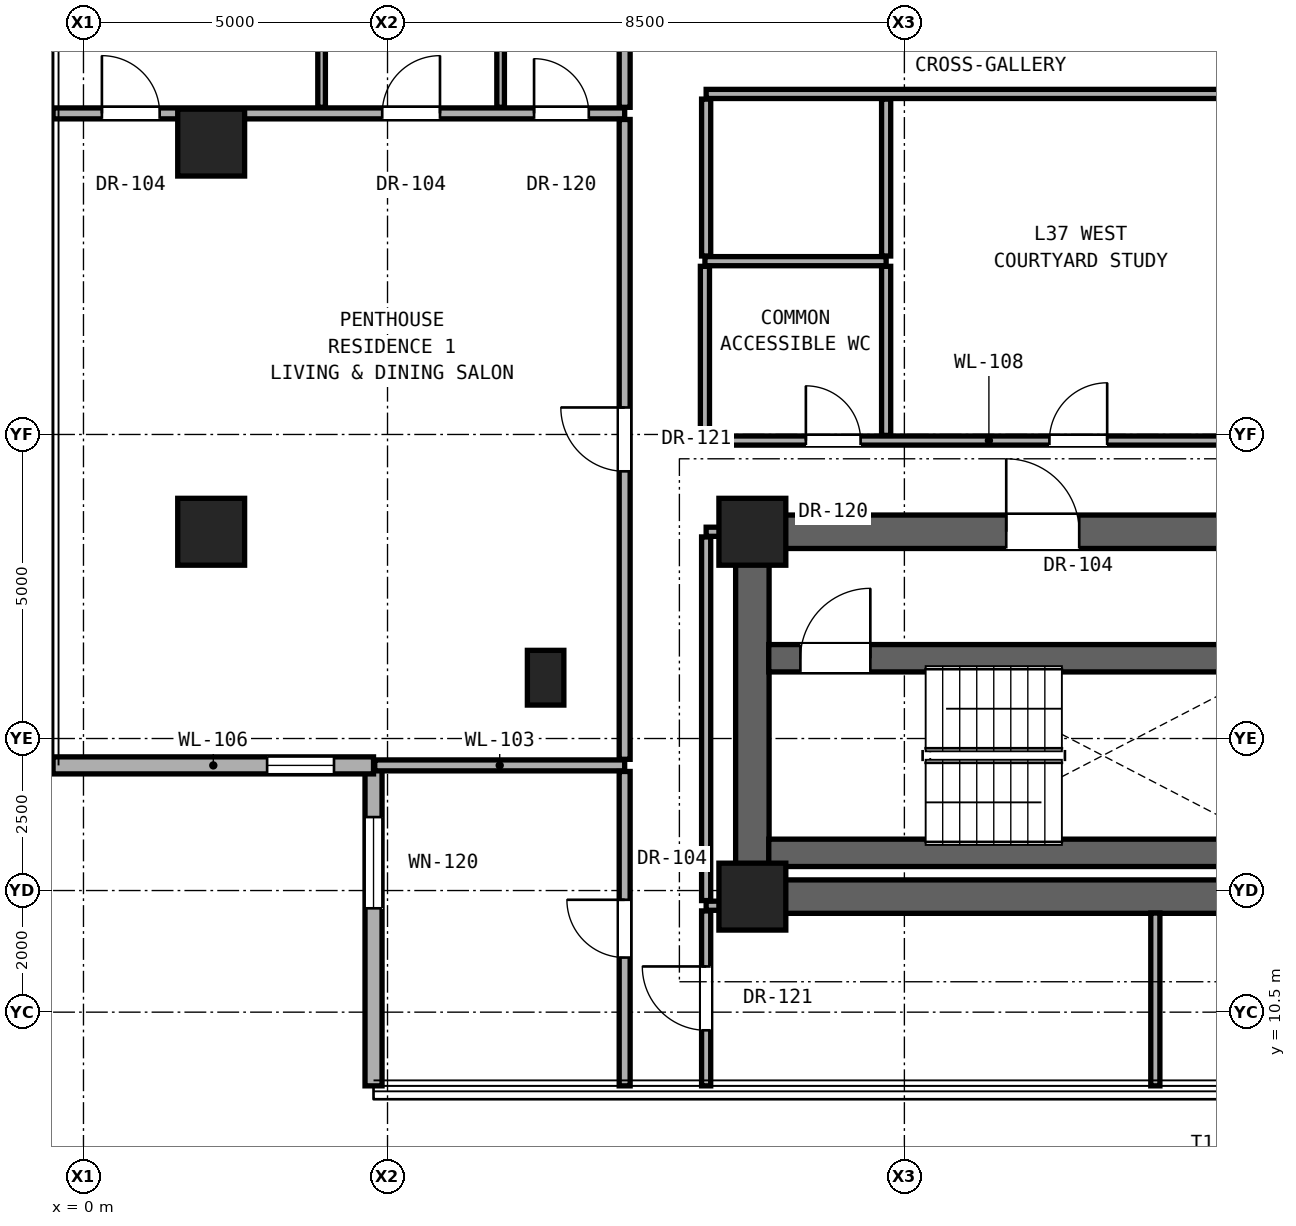
"""IFC4 building model, lengths in metres.
Left out: names, types, materials, properties, quantities, classifications, styles, units other than length and angle.
Written with IfcOpenShell. Run it as: python <this file> out.ifc"""

import sys

from ifc_helpers import new_model, si_unit, direction, frame, frame_2d, origin, origin_2d, place, context, subcontext, project, spatial, rectangle, hollow_rectangle, extrude, element, fill, save


model = new_model("IFC4")
c1 = context("Model", 3, precision=1e-05, world=origin(), true_north=direction((0.0, 1.0)))
c2 = subcontext(c1, "Body", "Model", "MODEL_VIEW")
j1 = project(units=[si_unit("LENGTHUNIT", "METRE"), si_unit("PLANEANGLEUNIT", "RADIAN")], contexts=[c1])
p1 = place(None, origin())
s1 = spatial("IfcSite", under=j1, at=p1, CompositionType="ELEMENT")
p2 = place(p1, origin())
s2 = spatial("IfcBuilding", under=s1, at=p2, CompositionType="ELEMENT")
p3 = place(p2, frame((0.0, 0.0, 131.3)))
s3 = spatial("IfcBuildingStorey", under=s2, at=p3, CompositionType="ELEMENT", Elevation=131.3)
for number, where, z_axis, x_axis in (
    (1, (11.0, 12.4, 0.0), (0.0, 0.0, 1.0), (1.0, 0.0, 0.0)),
    (2, (11.0, 18.4, 0.0), (0.0, 0.0, 1.0), (1.0, 0.0, 0.0)),
):
    element("IfcColumn", number, at=place(p3, frame(where, z_axis=z_axis, x_axis=x_axis)), inside=s3, PredefinedType="COLUMN", context=c2, shape_type="SweptSolid", body=[
        extrude(rectangle(XDim=1.1, YDim=1.1, at=origin_2d()), origin(), (0.0, 0.0, 1.0), 3.3),
    ])
for number, where, z_axis, x_axis in (
    (3, (2.1, 18.4, 0.0), (0.0, 0.0, 1.0), (1.0, 0.0, 0.0)),
    (4, (2.1, 24.8, 0.0), (0.0, 0.0, 1.0), (1.0, 0.0, 0.0)),
):
    element("IfcColumn", number, at=place(p3, frame(where, z_axis=z_axis, x_axis=x_axis)), inside=s3, PredefinedType="COLUMN", context=c2, shape_type="SweptSolid", body=[
        extrude(hollow_rectangle(XDim=1.1, YDim=1.1, WallThickness=0.06, at=origin_2d()), origin(), (0.0, 0.0, 1.0), 3.3),
    ])
p4 = place(p3, frame((7.6, 16.0, 0.0), z_axis=(0.0, 0.0, 1.0), x_axis=(1.0, 0.0, 0.0)))
e5 = element("IfcColumn", 5, at=p4, inside=s3, PredefinedType="PILASTER", context=c2, shape_type="SweptSolid", body=[
    extrude(rectangle(XDim=0.6, YDim=0.9, at=origin_2d()), origin(), (0.0, 0.0, 1.0), 3.3),
])
p5 = place(p3, frame((11.0, 12.4, 0.0), z_axis=(0.0, 0.0, 1.0), x_axis=(1.0, 0.0, 0.0)))
e6 = element("IfcWall", 6, at=p5, inside=s3, PredefinedType="SHEAR", context=c2, shape_type="SweptSolid", body=[
    extrude(rectangle(XDim=19.0, YDim=0.55, at=frame_2d((9.5, 0.0))), origin(), (0.0, 0.0, 1.0), 3.08),
])
p6 = place(p3, frame((11.0, 12.4, 0.0), z_axis=(0.0, 0.0, 1.0), x_axis=(0.0, 1.0, 0.0)))
e7 = element("IfcWall", 7, at=p6, inside=s3, PredefinedType="SHEAR", context=c2, shape_type="SweptSolid", body=[
    extrude(rectangle(XDim=6.0, YDim=0.55, at=frame_2d((3.0, 0.0))), origin(), (0.0, 0.0, 1.0), 3.08),
])
p7 = place(p3, frame((11.0, 18.4, 0.0), z_axis=(0.0, 0.0, 1.0), x_axis=(1.0, 0.0, 0.0)))
e8 = element("IfcWall", 8, at=p7, inside=s3, PredefinedType="SHEAR", context=c2, shape_type="SweptSolid", body=[
    extrude(rectangle(XDim=19.0, YDim=0.55, at=frame_2d((9.5, 0.0))), origin(), (0.0, 0.0, 1.0), 3.08),
])
p8 = place(p7, frame((4.175, 0.0, 0.0)))
e9 = element("IfcOpeningElement", 9, at=p8, cuts=e8, PredefinedType="OPENING", context=c2, shape_type="SweptSolid", body=[
    extrude(rectangle(XDim=1.2, YDim=2.25, at=frame_2d((0.6, 1.125))), frame((0.0, 0.285, 0.0), z_axis=(0.0, -1.0, 0.0), x_axis=(1.0, 0.0, 0.0)), (0.0, 0.0, 1.0), 0.57),
])
p9 = place(p7, frame((9.6, 0.0, 0.0)))
e10 = element("IfcOpeningElement", 10, at=p9, cuts=e8, PredefinedType="OPENING", context=c2, shape_type="SweptSolid", body=[
    extrude(rectangle(XDim=1.3, YDim=2.3, at=frame_2d((0.65, 1.15))), frame((0.0, 0.285, 0.0), z_axis=(0.0, -1.0, 0.0), x_axis=(1.0, 0.0, 0.0)), (0.0, 0.0, 1.0), 0.57),
])
p10 = place(p7, frame((11.9, 0.0, 0.0)))
e11 = element("IfcOpeningElement", 11, at=p10, cuts=e8, PredefinedType="OPENING", context=c2, shape_type="SweptSolid", body=[
    extrude(rectangle(XDim=1.3, YDim=2.3, at=frame_2d((0.65, 1.15))), frame((0.0, 0.285, 0.0), z_axis=(0.0, -1.0, 0.0), x_axis=(1.0, 0.0, 0.0)), (0.0, 0.0, 1.0), 0.57),
])
p11 = place(p7, frame((14.3, 0.0, 0.0)))
e12 = element("IfcOpeningElement", 12, at=p11, cuts=e8, PredefinedType="OPENING", context=c2, shape_type="SweptSolid", body=[
    extrude(rectangle(XDim=1.3, YDim=2.3, at=frame_2d((0.65, 1.15))), frame((0.0, 0.285, 0.0), z_axis=(0.0, -1.0, 0.0), x_axis=(1.0, 0.0, 0.0)), (0.0, 0.0, 1.0), 0.57),
])
p12 = place(p7, frame((16.6, 0.0, 0.0)))
e13 = element("IfcOpeningElement", 13, at=p12, cuts=e8, PredefinedType="OPENING", context=c2, shape_type="SweptSolid", body=[
    extrude(rectangle(XDim=1.3, YDim=2.3, at=frame_2d((0.65, 1.15))), frame((0.0, 0.285, 0.0), z_axis=(0.0, -1.0, 0.0), x_axis=(1.0, 0.0, 0.0)), (0.0, 0.0, 1.0), 0.57),
])
p13 = place(p3, frame((4.77, 14.558, 0.0), z_axis=(0.0, 0.0, 1.0), x_axis=(0.0, -1.0, 0.0)))
e14 = element("IfcWall", 14, at=p13, inside=s3, PredefinedType="SOLIDWALL", context=c2, shape_type="SweptSolid", body=[
    extrude(rectangle(XDim=5.27, YDim=0.28, at=frame_2d((2.635, 0.0))), origin(), (0.0, 0.0, 1.0), 3.06),
])
p14 = place(p13, frame((0.85, 0.0, 0.81)))
e15 = element("IfcOpeningElement", 15, at=p14, cuts=e14, PredefinedType="OPENING", context=c2, shape_type="SweptSolid", body=[
    extrude(rectangle(XDim=1.5, YDim=2.1, at=frame_2d((0.75, 1.05))), frame((0.0, 0.15, 0.0), z_axis=(0.0, -1.0, 0.0), x_axis=(1.0, 0.0, 0.0)), (0.0, 0.0, 1.0), 0.3),
])
p15 = place(p3, frame((-0.5, 14.558, 0.0), z_axis=(0.0, 0.0, 1.0), x_axis=(1.0, 0.0, 0.0)))
e16 = element("IfcWall", 16, at=p15, inside=s3, PredefinedType="SOLIDWALL", context=c2, shape_type="SweptSolid", body=[
    extrude(rectangle(XDim=5.27, YDim=0.28, at=frame_2d((2.635, 0.0))), origin(), (0.0, 0.0, 1.0), 3.06),
])
p16 = place(p15, frame((3.52, 0.0, 0.85)))
e17 = element("IfcOpeningElement", 17, at=p16, cuts=e16, PredefinedType="OPENING", context=c2, shape_type="SweptSolid", body=[
    extrude(rectangle(XDim=1.1, YDim=2.0, at=frame_2d((0.55, 1.0))), frame((0.0, 0.15, 0.0), z_axis=(0.0, -1.0, 0.0), x_axis=(1.0, 0.0, 0.0)), (0.0, 0.0, 1.0), 0.3),
])
p17 = place(p3, frame((10.24, 12.25, 0.0), z_axis=(0.0, 0.0, 1.0), x_axis=(1.0, 0.0, 0.0)))
e18 = element("IfcWall", 18, at=p17, inside=s3, PredefinedType="PARTITIONING", context=c2, shape_type="SweptSolid", body=[
    extrude(rectangle(XDim=0.49, YDim=0.15, at=frame_2d((0.245, 0.0))), origin(), (0.0, 0.0, 1.0), 3.08),
])
p18 = place(p3, frame((11.27, 13.12, 0.0), z_axis=(0.0, 0.0, 1.0), x_axis=(1.0, 0.0, 0.0)))
e19 = element("IfcWall", 19, at=p18, inside=s3, PredefinedType="SHEAR", context=c2, shape_type="SweptSolid", body=[
    extrude(rectangle(XDim=8.46, YDim=0.45, at=frame_2d((4.23, 0.0))), origin(), (0.0, 0.0, 1.0), 3.08),
])
p19 = place(p3, frame((4.79, 14.558, 0.0), z_axis=(0.0, 0.0, 1.0), x_axis=(1.0, 0.0, 0.0)))
e20 = element("IfcWall", 20, at=p19, inside=s3, PredefinedType="PARTITIONING", context=c2, shape_type="SweptSolid", body=[
    extrude(rectangle(XDim=4.11, YDim=0.18, at=frame_2d((2.055, 0.0))), origin(), (0.0, 0.0, 1.0), 3.08),
])
p20 = place(p3, frame((11.27, 16.32, 0.0), z_axis=(0.0, 0.0, 1.0), x_axis=(1.0, 0.0, 0.0)))
e21 = element("IfcWall", 21, at=p20, inside=s3, PredefinedType="SHEAR", context=c2, shape_type="SweptSolid", body=[
    extrude(rectangle(XDim=9.01, YDim=0.45, at=frame_2d((4.505, 0.0))), origin(), (0.0, 0.0, 1.0), 3.08),
])
p21 = place(p20, frame((0.52, 0.0, 0.0)))
e22 = element("IfcOpeningElement", 22, at=p21, cuts=e21, PredefinedType="OPENING", context=c2, shape_type="SweptSolid", body=[
    extrude(rectangle(XDim=1.15, YDim=2.2, at=frame_2d((0.575, 1.1))), frame((0.0, 0.235, 0.0), z_axis=(0.0, -1.0, 0.0), x_axis=(1.0, 0.0, 0.0)), (0.0, 0.0, 1.0), 0.47),
])
p22 = place(p3, frame((10.24, 18.4, 0.0), z_axis=(0.0, 0.0, 1.0), x_axis=(1.0, 0.0, 0.0)))
e23 = element("IfcWall", 23, at=p22, inside=s3, PredefinedType="PARTITIONING", context=c2, shape_type="SweptSolid", body=[
    extrude(rectangle(XDim=0.49, YDim=0.15, at=frame_2d((0.245, 0.0))), origin(), (0.0, 0.0, 1.0), 2.456),
])
p23 = place(p3, frame((10.22, 19.9, 0.0), z_axis=(0.0, 0.0, 1.0), x_axis=(1.0, 0.0, 0.0)))
e24 = element("IfcWall", 24, at=p23, inside=s3, PredefinedType="PARTITIONING", context=c2, shape_type="SweptSolid", body=[
    extrude(rectangle(XDim=9.34, YDim=0.15, at=frame_2d((4.67, 0.0))), origin(), (0.0, 0.0, 1.0), 2.216),
])
p24 = place(p23, frame((1.66, 0.0, 0.0)))
e25 = element("IfcOpeningElement", 25, at=p24, cuts=e24, PredefinedType="OPENING", context=c2, shape_type="SweptSolid", body=[
    extrude(rectangle(XDim=0.9, YDim=2.1, at=frame_2d((0.45, 1.05))), frame((0.0, 0.085, 0.0), z_axis=(0.0, -1.0, 0.0), x_axis=(1.0, 0.0, 0.0)), (0.0, 0.0, 1.0), 0.17),
])
p25 = place(p23, frame((5.665, 0.0, 0.0)))
e26 = element("IfcOpeningElement", 26, at=p25, cuts=e24, PredefinedType="OPENING", context=c2, shape_type="SweptSolid", body=[
    extrude(rectangle(XDim=0.95, YDim=2.15, at=frame_2d((0.475, 1.075))), frame((0.0, 0.085, 0.0), z_axis=(0.0, -1.0, 0.0), x_axis=(1.0, 0.0, 0.0)), (0.0, 0.0, 1.0), 0.17),
])
p26 = place(p3, frame((10.22, 22.85, 0.0), z_axis=(0.0, 0.0, 1.0), x_axis=(1.0, 0.0, 0.0)))
e27 = element("IfcWall", 27, at=p26, inside=s3, PredefinedType="PARTITIONING", context=c2, shape_type="SweptSolid", body=[
    extrude(rectangle(XDim=2.98, YDim=0.15, at=frame_2d((1.49, 0.0))), origin(), (0.0, 0.0, 1.0), 2.216),
])
p27 = place(p3, frame((-0.5, 25.28, 0.0), z_axis=(0.0, 0.0, 1.0), x_axis=(1.0, 0.0, 0.0)))
e28 = element("IfcWall", 28, at=p27, inside=s3, PredefinedType="PARTITIONING", context=c2, shape_type="SweptSolid", body=[
    extrude(rectangle(XDim=9.4, YDim=0.18, at=frame_2d((4.7, 0.0))), origin(), (0.0, 0.0, 1.0), 2.299),
])
p28 = place(p27, frame((0.803, 0.0, 0.0)))
e29 = element("IfcOpeningElement", 29, at=p28, cuts=e28, PredefinedType="OPENING", context=c2, shape_type="SweptSolid", body=[
    extrude(rectangle(XDim=0.95, YDim=2.15, at=frame_2d((0.475, 1.075))), frame((0.0, 0.1, 0.0), z_axis=(0.0, -1.0, 0.0), x_axis=(1.0, 0.0, 0.0)), (0.0, 0.0, 1.0), 0.2),
])
p29 = place(p27, frame((5.413, 0.0, 0.0)))
e30 = element("IfcOpeningElement", 30, at=p29, cuts=e28, PredefinedType="OPENING", context=c2, shape_type="SweptSolid", body=[
    extrude(rectangle(XDim=0.95, YDim=2.15, at=frame_2d((0.475, 1.075))), frame((0.0, 0.1, 0.0), z_axis=(0.0, -1.0, 0.0), x_axis=(1.0, 0.0, 0.0)), (0.0, 0.0, 1.0), 0.2),
])
p30 = place(p27, frame((7.91, 0.0, 0.0)))
e31 = element("IfcOpeningElement", 31, at=p30, cuts=e28, PredefinedType="OPENING", context=c2, shape_type="SweptSolid", body=[
    extrude(rectangle(XDim=0.9, YDim=2.1, at=frame_2d((0.45, 1.05))), frame((0.0, 0.1, 0.0), z_axis=(0.0, -1.0, 0.0), x_axis=(1.0, 0.0, 0.0)), (0.0, 0.0, 1.0), 0.2),
])
p31 = place(p3, frame((10.24, 25.6, 0.0), z_axis=(0.0, 0.0, 1.0), x_axis=(1.0, 0.0, 0.0)))
e32 = element("IfcWall", 32, at=p31, inside=s3, PredefinedType="PARTITIONING", context=c2, shape_type="SweptSolid", body=[
    extrude(rectangle(XDim=9.36, YDim=0.15, at=frame_2d((4.68, 0.0))), origin(), (0.0, 0.0, 1.0), 2.216),
])
for number, where, z_axis, x_axis in (
    (33, (3.916, 25.38, 0.0), (0.0, 0.0, 1.0), (0.0, 1.0, 0.0)),
    (34, (6.86, 25.38, 0.0), (0.0, 0.0, 1.0), (0.0, 1.0, 0.0)),
):
    element("IfcWall", number, at=place(p3, frame(where, z_axis=z_axis, x_axis=x_axis)), inside=s3, PredefinedType="PARTITIONING", context=c2, shape_type="SweptSolid", body=[
        extrude(rectangle(XDim=2.548, YDim=0.125, at=frame_2d((1.274, 0.0))), origin(), (0.0, 0.0, 1.0), 3.08),
    ])
p32 = place(p3, frame((8.9, 9.288, 0.0), z_axis=(0.0, 0.0, 1.0), x_axis=(0.0, 1.0, 0.0)))
e35 = element("IfcWall", 35, at=p32, inside=s3, PredefinedType="PARTITIONING", context=c2, shape_type="SweptSolid", body=[
    extrude(rectangle(XDim=5.17, YDim=0.18, at=frame_2d((2.585, 0.0))), origin(), (0.0, 0.0, 1.0), 3.08),
])
p33 = place(p32, frame((2.11, 0.0, 0.0)))
e36 = element("IfcOpeningElement", 36, at=p33, cuts=e35, PredefinedType="OPENING", context=c2, shape_type="SweptSolid", body=[
    extrude(rectangle(XDim=0.95, YDim=2.15, at=frame_2d((0.475, 1.075))), frame((0.0, 0.1, 0.0), z_axis=(0.0, -1.0, 0.0), x_axis=(1.0, 0.0, 0.0)), (0.0, 0.0, 1.0), 0.2),
])
p34 = place(p3, frame((8.9, 14.658, 0.0), z_axis=(0.0, 0.0, 1.0), x_axis=(0.0, 1.0, 0.0)))
e37 = element("IfcWall", 37, at=p34, inside=s3, PredefinedType="PARTITIONING", context=c2, shape_type="SweptSolid", body=[
    extrude(rectangle(XDim=10.522, YDim=0.18, at=frame_2d((5.261, 0.0))), origin(), (0.0, 0.0, 1.0), 2.299),
])
p35 = place(p34, frame((4.736, 0.0, 0.0)))
e38 = element("IfcOpeningElement", 38, at=p35, cuts=e37, PredefinedType="OPENING", context=c2, shape_type="SweptSolid", body=[
    extrude(rectangle(XDim=1.05, YDim=2.2, at=frame_2d((0.525, 1.1))), frame((0.0, 0.1, 0.0), z_axis=(0.0, -1.0, 0.0), x_axis=(1.0, 0.0, 0.0)), (0.0, 0.0, 1.0), 0.2),
])
p36 = place(p3, frame((8.9, 25.38, 0.0), z_axis=(0.0, 0.0, 1.0), x_axis=(0.0, 1.0, 0.0)))
e39 = element("IfcWall", 39, at=p36, inside=s3, PredefinedType="PARTITIONING", context=c2, shape_type="SweptSolid", body=[
    extrude(rectangle(XDim=2.548, YDim=0.18, at=frame_2d((1.274, 0.0))), origin(), (0.0, 0.0, 1.0), 3.08),
])
p37 = place(p3, frame((10.22, 19.985, 0.0), z_axis=(0.0, 0.0, 1.0), x_axis=(0.0, 1.0, 0.0)))
e40 = element("IfcWall", 40, at=p37, inside=s3, PredefinedType="PARTITIONING", context=c2, shape_type="SweptSolid", body=[
    extrude(rectangle(XDim=2.78, YDim=0.15, at=frame_2d((1.39, 0.0))), origin(), (0.0, 0.0, 1.0), 3.08),
])
p38 = place(p3, frame((10.24, 9.288, 0.0), z_axis=(0.0, 0.0, 1.0), x_axis=(0.0, 1.0, 0.0)))
e41 = element("IfcWall", 41, at=p38, inside=s3, PredefinedType="PARTITIONING", context=c2, shape_type="SweptSolid", body=[
    extrude(rectangle(XDim=2.877, YDim=0.15, at=frame_2d((1.438, 0.0))), origin(), (0.0, 0.0, 1.0), 3.08),
])
p39 = place(p38, frame((0.914, 0.0, 0.0)))
e42 = element("IfcOpeningElement", 42, at=p39, cuts=e41, PredefinedType="OPENING", context=c2, shape_type="SweptSolid", body=[
    extrude(rectangle(XDim=1.05, YDim=2.2, at=frame_2d((0.525, 1.1))), frame((0.0, 0.085, 0.0), z_axis=(0.0, -1.0, 0.0), x_axis=(1.0, 0.0, 0.0)), (0.0, 0.0, 1.0), 0.17),
])
p40 = place(p3, frame((10.24, 12.335, 0.0), z_axis=(0.0, 0.0, 1.0), x_axis=(0.0, 1.0, 0.0)))
e43 = element("IfcWall", 43, at=p40, inside=s3, PredefinedType="PARTITIONING", context=c2, shape_type="SweptSolid", body=[
    extrude(rectangle(XDim=5.98, YDim=0.15, at=frame_2d((2.99, 0.0))), origin(), (0.0, 0.0, 1.0), 2.456),
])
p41 = place(p3, frame((10.24, 22.935, 0.0), z_axis=(0.0, 0.0, 1.0), x_axis=(0.0, 1.0, 0.0)))
e44 = element("IfcWall", 44, at=p41, inside=s3, PredefinedType="PARTITIONING", context=c2, shape_type="SweptSolid", body=[
    extrude(rectangle(XDim=2.58, YDim=0.15, at=frame_2d((1.29, 0.0))), origin(), (0.0, 0.0, 1.0), 2.299),
])
p42 = place(p3, frame((13.2, 19.985, 0.0), z_axis=(0.0, 0.0, 1.0), x_axis=(0.0, 1.0, 0.0)))
e45 = element("IfcWall", 45, at=p42, inside=s3, PredefinedType="PARTITIONING", context=c2, shape_type="SweptSolid", body=[
    extrude(rectangle(XDim=2.78, YDim=0.15, at=frame_2d((1.39, 0.0))), origin(), (0.0, 0.0, 1.0), 3.08),
])
p43 = place(p3, frame((13.2, 22.935, 0.0), z_axis=(0.0, 0.0, 1.0), x_axis=(0.0, 1.0, 0.0)))
e46 = element("IfcWall", 46, at=p43, inside=s3, PredefinedType="PARTITIONING", context=c2, shape_type="SweptSolid", body=[
    extrude(rectangle(XDim=2.58, YDim=0.15, at=frame_2d((1.29, 0.0))), origin(), (0.0, 0.0, 1.0), 2.216),
])
p44 = place(p3, frame((17.627, 9.288, 0.0), z_axis=(0.0, 0.0, 1.0), x_axis=(0.0, 1.0, 0.0)))
e47 = element("IfcWall", 47, at=p44, inside=s3, PredefinedType="PARTITIONING", context=c2, shape_type="SweptSolid", body=[
    extrude(rectangle(XDim=2.842, YDim=0.15, at=frame_2d((1.421, 0.0))), origin(), (0.0, 0.0, 1.0), 3.08),
])
p45 = place(p14, origin())
e48 = element("IfcWindow", 48, at=p45, inside=s3, PartitioningType="SINGLE_PANEL", PredefinedType="WINDOW", context=c2, shape_type="SweptSolid", body=[
    extrude(rectangle(XDim=1.5, YDim=2.1, at=frame_2d((0.75, 1.05))), frame((0.0, 0.03, 0.0), z_axis=(0.0, -1.0, 0.0), x_axis=(1.0, 0.0, 0.0)), (0.0, 0.0, 1.0), 0.06),
])
fill(e15, e48)
p46 = place(p16, origin())
e49 = element("IfcWindow", 49, at=p46, inside=s3, PartitioningType="SINGLE_PANEL", PredefinedType="WINDOW", context=c2, shape_type="SweptSolid", body=[
    extrude(rectangle(XDim=1.1, YDim=2.0, at=frame_2d((0.55, 1.0))), frame((0.0, 0.03, 0.0), z_axis=(0.0, -1.0, 0.0), x_axis=(1.0, 0.0, 0.0)), (0.0, 0.0, 1.0), 0.06),
])
fill(e17, e49)
p47 = place(p8, origin())
e50 = element("IfcDoor", 50, at=p47, inside=s3, OperationType="SINGLE_SWING_LEFT", PredefinedType="DOOR", context=c2, shape_type="SweptSolid", body=[
    extrude(rectangle(XDim=1.2, YDim=2.25, at=frame_2d((0.6, 1.125))), frame((0.0, 0.025, 0.0), z_axis=(0.0, -1.0, 0.0), x_axis=(1.0, 0.0, 0.0)), (0.0, 0.0, 1.0), 0.05),
])
fill(e9, e50)
p48 = place(p21, origin())
e51 = element("IfcDoor", 51, at=p48, inside=s3, OperationType="SINGLE_SWING_RIGHT", PredefinedType="DOOR", context=c2, shape_type="SweptSolid", body=[
    extrude(rectangle(XDim=1.15, YDim=2.2, at=frame_2d((0.575, 1.1))), frame((0.0, 0.025, 0.0), z_axis=(0.0, -1.0, 0.0), x_axis=(1.0, 0.0, 0.0)), (0.0, 0.0, 1.0), 0.05),
])
fill(e22, e51)
p49 = place(p24, origin())
e52 = element("IfcDoor", 52, at=p49, inside=s3, OperationType="SINGLE_SWING_LEFT", PredefinedType="DOOR", context=c2, shape_type="SweptSolid", body=[
    extrude(rectangle(XDim=0.9, YDim=2.1, at=frame_2d((0.45, 1.05))), frame((0.0, 0.025, 0.0), z_axis=(0.0, -1.0, 0.0), x_axis=(1.0, 0.0, 0.0)), (0.0, 0.0, 1.0), 0.05),
])
fill(e25, e52)
p50 = place(p35, origin())
e53 = element("IfcDoor", 53, at=p50, inside=s3, OperationType="SINGLE_SWING_RIGHT", PredefinedType="DOOR", context=c2, shape_type="SweptSolid", body=[
    extrude(rectangle(XDim=1.05, YDim=2.2, at=frame_2d((0.525, 1.1))), frame((0.0, 0.025, 0.0), z_axis=(0.0, -1.0, 0.0), x_axis=(1.0, 0.0, 0.0)), (0.0, 0.0, 1.0), 0.05),
])
fill(e38, e53)
p51 = place(p28, origin())
e54 = element("IfcDoor", 54, at=p51, inside=s3, OperationType="SINGLE_SWING_LEFT", PredefinedType="DOOR", context=c2, shape_type="SweptSolid", body=[
    extrude(rectangle(XDim=0.95, YDim=2.15, at=frame_2d((0.475, 1.075))), frame((0.0, 0.025, 0.0), z_axis=(0.0, -1.0, 0.0), x_axis=(1.0, 0.0, 0.0)), (0.0, 0.0, 1.0), 0.05),
])
fill(e29, e54)
p52 = place(p29, origin())
e55 = element("IfcDoor", 55, at=p52, inside=s3, OperationType="SINGLE_SWING_RIGHT", PredefinedType="DOOR", context=c2, shape_type="SweptSolid", body=[
    extrude(rectangle(XDim=0.95, YDim=2.15, at=frame_2d((0.475, 1.075))), frame((0.0, 0.025, 0.0), z_axis=(0.0, -1.0, 0.0), x_axis=(1.0, 0.0, 0.0)), (0.0, 0.0, 1.0), 0.05),
])
fill(e30, e55)
p53 = place(p30, origin())
e56 = element("IfcDoor", 56, at=p53, inside=s3, OperationType="SINGLE_SWING_LEFT", PredefinedType="DOOR", context=c2, shape_type="SweptSolid", body=[
    extrude(rectangle(XDim=0.9, YDim=2.1, at=frame_2d((0.45, 1.05))), frame((0.0, 0.025, 0.0), z_axis=(0.0, -1.0, 0.0), x_axis=(1.0, 0.0, 0.0)), (0.0, 0.0, 1.0), 0.05),
])
fill(e31, e56)
p54 = place(p25, origin())
e57 = element("IfcDoor", 57, at=p54, inside=s3, OperationType="SINGLE_SWING_RIGHT", PredefinedType="DOOR", context=c2, shape_type="SweptSolid", body=[
    extrude(rectangle(XDim=0.95, YDim=2.15, at=frame_2d((0.475, 1.075))), frame((0.0, 0.025, 0.0), z_axis=(0.0, -1.0, 0.0), x_axis=(1.0, 0.0, 0.0)), (0.0, 0.0, 1.0), 0.05),
])
fill(e26, e57)
p55 = place(p39, origin())
e58 = element("IfcDoor", 58, at=p55, inside=s3, OperationType="SINGLE_SWING_RIGHT", PredefinedType="DOOR", context=c2, shape_type="SweptSolid", body=[
    extrude(rectangle(XDim=1.05, YDim=2.2, at=frame_2d((0.525, 1.1))), frame((0.0, 0.025, 0.0), z_axis=(0.0, -1.0, 0.0), x_axis=(1.0, 0.0, 0.0)), (0.0, 0.0, 1.0), 0.05),
])
fill(e42, e58)
p56 = place(p33, origin())
e59 = element("IfcDoor", 59, at=p56, inside=s3, OperationType="SINGLE_SWING_RIGHT", PredefinedType="DOOR", context=c2, shape_type="SweptSolid", body=[
    extrude(rectangle(XDim=0.95, YDim=2.15, at=frame_2d((0.475, 1.075))), frame((0.0, 0.025, 0.0), z_axis=(0.0, -1.0, 0.0), x_axis=(1.0, 0.0, 0.0)), (0.0, 0.0, 1.0), 0.05),
])
fill(e36, e59)
save(model, sys.argv[1])
